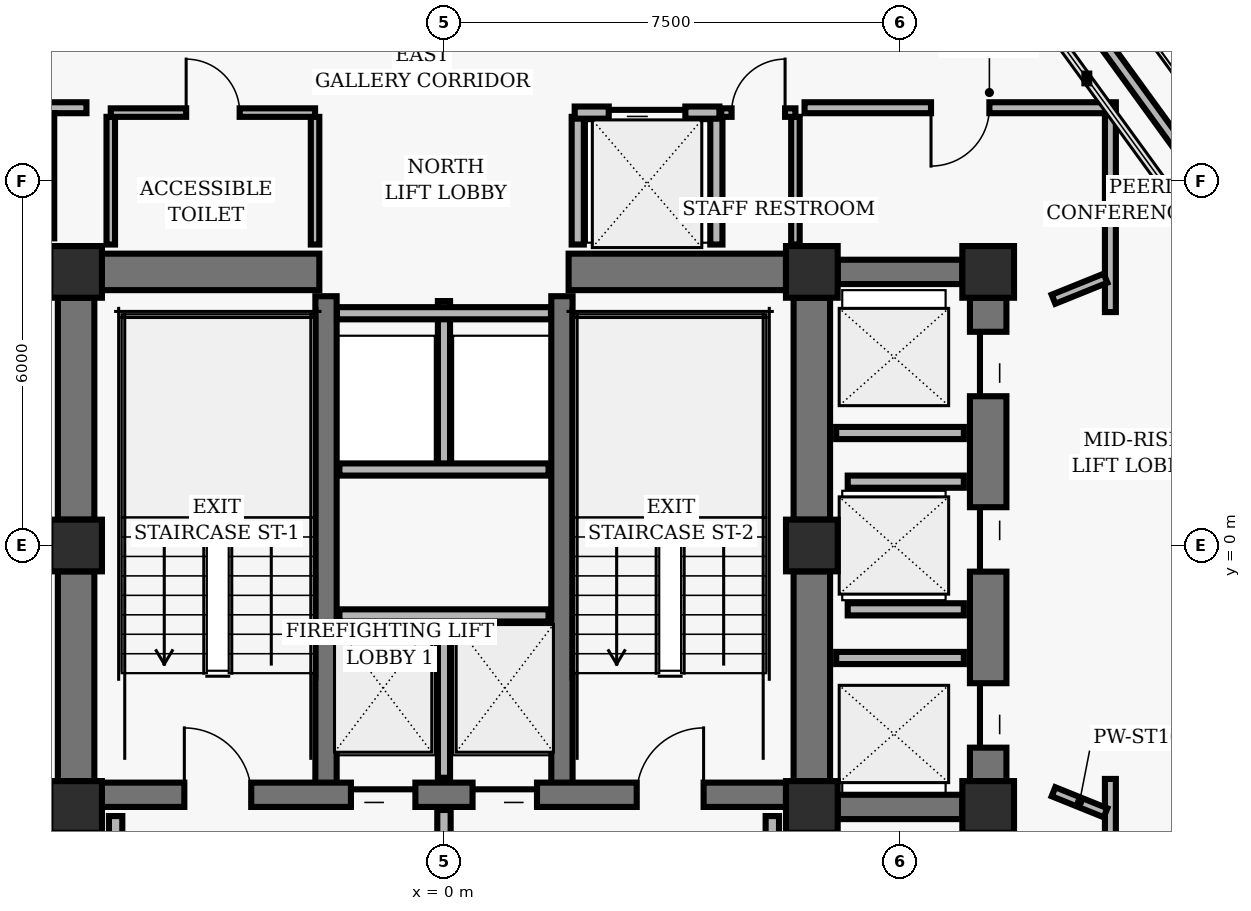
"""IFC4 building model, lengths in metres.
Left out: names, types, materials, properties, quantities, classifications, styles, units other than length and angle.
Written with IfcOpenShell. Run it as: python <this file> out.ifc"""

import sys

from ifc_helpers import new_model, si_unit, direction, frame, frame_2d, origin, origin_2d, place, context, subcontext, project, spatial, rectangle, hollow_rectangle, extrude, element, fill, save


model = new_model("IFC4")
c1 = context("Model", 3, precision=1e-05, world=origin(), true_north=direction((0.0, 1.0)))
c2 = subcontext(c1, "Body", "Model", "MODEL_VIEW")
j1 = project(units=[si_unit("LENGTHUNIT", "METRE"), si_unit("PLANEANGLEUNIT", "RADIAN")], contexts=[c1])
p1 = place(None, origin())
s1 = spatial("IfcSite", under=j1, at=p1, CompositionType="ELEMENT")
p2 = place(p1, origin())
s2 = spatial("IfcBuilding", under=s1, at=p2, CompositionType="ELEMENT")
p3 = place(p2, frame((0.0, 0.0, 119.84)))
s3 = spatial("IfcBuildingStorey", under=s2, at=p3, CompositionType="ELEMENT", Elevation=119.84)
for number, where, z_axis, x_axis in (
    (1, (-6.05, 4.5, 0.0), (0.0, 0.0, 1.0), (1.0, 0.0, 0.0)),
    (2, (6.05, 4.5, 0.0), (0.0, 0.0, 1.0), (1.0, 0.0, 0.0)),
    (3, (-6.05, 0.0, 0.0), (0.0, 0.0, 1.0), (1.0, 0.0, 0.0)),
    (4, (6.05, 0.0, 0.0), (0.0, 0.0, 1.0), (1.0, 0.0, 0.0)),
    (5, (-6.05, -4.3, 0.0), (0.0, 0.0, 1.0), (1.0, 0.0, 0.0)),
    (6, (6.05, -4.3, 0.0), (0.0, 0.0, 1.0), (1.0, 0.0, 0.0)),
    (7, (8.95, 4.5, 0.0), (0.0, 0.0, 1.0), (1.0, 0.0, 0.0)),
    (8, (8.95, -4.3, 0.0), (0.0, 0.0, 1.0), (1.0, 0.0, 0.0)),
):
    element("IfcColumn", number, at=place(p3, frame(where, z_axis=z_axis, x_axis=x_axis)), inside=s3, PredefinedType="COLUMN", context=c2, shape_type="SweptSolid", body=[
        extrude(hollow_rectangle(XDim=0.85, YDim=0.85, WallThickness=0.055, InnerFilletRadius=0.02, OuterFilletRadius=0.04, at=origin_2d()), origin(), (0.0, 0.0, 1.0), 3.04),
    ])
p4 = place(p3, frame((-6.05, 0.425, 0.0), z_axis=(0.0, 0.0, 1.0), x_axis=(0.0, 1.0, 0.0)))
e9 = element("IfcWall", 9, at=p4, inside=s3, PredefinedType="SHEAR", context=c2, shape_type="SweptSolid", body=[
    extrude(rectangle(XDim=3.65, YDim=0.6, at=frame_2d((1.825, 0.0))), origin(), (0.0, 0.0, 1.0), 2.788),
])
p5 = place(p3, frame((-6.05, -3.875, 0.0), z_axis=(0.0, 0.0, 1.0), x_axis=(0.0, 1.0, 0.0)))
e10 = element("IfcWall", 10, at=p5, inside=s3, PredefinedType="SHEAR", context=c2, shape_type="SweptSolid", body=[
    extrude(rectangle(XDim=3.45, YDim=0.6, at=frame_2d((1.725, 0.0))), origin(), (0.0, 0.0, 1.0), 2.788),
])
p6 = place(p3, frame((6.05, 0.425, 0.0), z_axis=(0.0, 0.0, 1.0), x_axis=(0.0, 1.0, 0.0)))
e11 = element("IfcWall", 11, at=p6, inside=s3, PredefinedType="SHEAR", context=c2, shape_type="SweptSolid", body=[
    extrude(rectangle(XDim=3.65, YDim=0.6, at=frame_2d((1.825, 0.0))), origin(), (0.0, 0.0, 1.0), 2.788),
])
p7 = place(p3, frame((6.05, -3.875, 0.0), z_axis=(0.0, 0.0, 1.0), x_axis=(0.0, 1.0, 0.0)))
e12 = element("IfcWall", 12, at=p7, inside=s3, PredefinedType="SHEAR", context=c2, shape_type="SweptSolid", body=[
    extrude(rectangle(XDim=3.45, YDim=0.6, at=frame_2d((1.725, 0.0))), origin(), (0.0, 0.0, 1.0), 2.788),
])
for number, where, z_axis, x_axis in (
    (13, (-1.94, -4.1, 0.0), (0.0, 0.0, 1.0), (0.0, 1.0, 0.0)),
    (14, (1.94, -4.1, 0.0), (0.0, 0.0, 1.0), (0.0, 1.0, 0.0)),
):
    element("IfcWall", number, at=place(p3, frame(where, z_axis=z_axis, x_axis=x_axis)), inside=s3, PredefinedType="SHEAR", context=c2, shape_type="SweptSolid", body=[
        extrude(rectangle(XDim=8.2, YDim=0.35, at=frame_2d((4.1, 0.0))), origin(), (0.0, 0.0, 1.0), 2.788),
    ])
p8 = place(p3, frame((-5.625, -4.1, 0.0), z_axis=(0.0, 0.0, 1.0), x_axis=(1.0, 0.0, 0.0)))
e15 = element("IfcWall", 15, at=p8, inside=s3, PredefinedType="SHEAR", context=c2, shape_type="SweptSolid", body=[
    extrude(rectangle(XDim=11.25, YDim=0.4, at=frame_2d((5.625, 0.0))), origin(), (0.0, 0.0, 1.0), 2.788),
])
p9 = place(p8, frame((1.355, 0.0, 0.0)))
e16 = element("IfcOpeningElement", 16, at=p9, cuts=e15, PredefinedType="OPENING", context=c2, shape_type="SweptSolid", body=[
    extrude(rectangle(XDim=1.1, YDim=2.04, at=frame_2d((0.55, 1.02))), frame((0.0, 0.21, 0.0), z_axis=(0.0, -1.0, 0.0), x_axis=(1.0, 0.0, 0.0)), (0.0, 0.0, 1.0), 0.42),
])
p10 = place(p8, frame((8.795, 0.0, 0.0)))
e17 = element("IfcOpeningElement", 17, at=p10, cuts=e15, PredefinedType="OPENING", context=c2, shape_type="SweptSolid", body=[
    extrude(rectangle(XDim=1.1, YDim=2.04, at=frame_2d((0.55, 1.02))), frame((0.0, 0.21, 0.0), z_axis=(0.0, -1.0, 0.0), x_axis=(1.0, 0.0, 0.0)), (0.0, 0.0, 1.0), 0.42),
])
p11 = place(p8, frame((4.095, 0.0, 0.0)))
e18 = element("IfcOpeningElement", 18, at=p11, cuts=e15, PredefinedType="OPENING", context=c2, shape_type="SweptSolid", body=[
    extrude(rectangle(XDim=1.06, YDim=2.04, at=frame_2d((0.53, 1.02))), frame((0.0, 0.21, 0.0), z_axis=(0.0, -1.0, 0.0), x_axis=(1.0, 0.0, 0.0)), (0.0, 0.0, 1.0), 0.42),
])
p12 = place(p8, frame((6.095, 0.0, 0.0)))
e19 = element("IfcOpeningElement", 19, at=p12, cuts=e15, PredefinedType="OPENING", context=c2, shape_type="SweptSolid", body=[
    extrude(rectangle(XDim=1.06, YDim=2.04, at=frame_2d((0.53, 1.02))), frame((0.0, 0.21, 0.0), z_axis=(0.0, -1.0, 0.0), x_axis=(1.0, 0.0, 0.0)), (0.0, 0.0, 1.0), 0.42),
])
for number, where, z_axis, x_axis in (
    (20, (-5.625, 4.5, 0.0), (0.0, 0.0, 1.0), (1.0, 0.0, 0.0)),
    (21, (2.05, 4.5, 0.0), (0.0, 0.0, 1.0), (1.0, 0.0, 0.0)),
):
    element("IfcWall", number, at=place(p3, frame(where, z_axis=z_axis, x_axis=x_axis)), inside=s3, PredefinedType="SHEAR", context=c2, shape_type="SweptSolid", body=[
        extrude(rectangle(XDim=3.575, YDim=0.6, at=frame_2d((1.788, 0.0))), origin(), (0.0, 0.0, 1.0), 2.788),
    ])
p13 = place(p3, frame((8.95, -3.875, 0.0), z_axis=(0.0, 0.0, 1.0), x_axis=(0.0, 1.0, 0.0)))
e22 = element("IfcWall", 22, at=p13, inside=s3, PredefinedType="SHEAR", context=c2, shape_type="SweptSolid", body=[
    extrude(rectangle(XDim=7.95, YDim=0.6, at=frame_2d((3.975, 0.0))), origin(), (0.0, 0.0, 1.0), 2.788),
])
p14 = place(p13, frame((0.55, 0.0, 0.0)))
e23 = element("IfcOpeningElement", 23, at=p14, cuts=e22, PredefinedType="OPENING", context=c2, shape_type="SweptSolid", body=[
    extrude(rectangle(XDim=1.06, YDim=2.04, at=frame_2d((0.53, 1.02))), frame((0.0, 0.31, 0.0), z_axis=(0.0, -1.0, 0.0), x_axis=(1.0, 0.0, 0.0)), (0.0, 0.0, 1.0), 0.62),
])
p15 = place(p13, frame((3.445, 0.0, 0.0)))
e24 = element("IfcOpeningElement", 24, at=p15, cuts=e22, PredefinedType="OPENING", context=c2, shape_type="SweptSolid", body=[
    extrude(rectangle(XDim=1.06, YDim=2.04, at=frame_2d((0.53, 1.02))), frame((0.0, 0.31, 0.0), z_axis=(0.0, -1.0, 0.0), x_axis=(1.0, 0.0, 0.0)), (0.0, 0.0, 1.0), 0.62),
])
p16 = place(p13, frame((6.33, 0.0, 0.0)))
e25 = element("IfcOpeningElement", 25, at=p16, cuts=e22, PredefinedType="OPENING", context=c2, shape_type="SweptSolid", body=[
    extrude(rectangle(XDim=1.06, YDim=2.04, at=frame_2d((0.53, 1.02))), frame((0.0, 0.31, 0.0), z_axis=(0.0, -1.0, 0.0), x_axis=(1.0, 0.0, 0.0)), (0.0, 0.0, 1.0), 0.62),
])
for number, where, z_axis, x_axis in (
    (26, (6.475, 4.5, 0.0), (0.0, 0.0, 1.0), (1.0, 0.0, 0.0)),
    (27, (6.475, -4.3, 0.0), (0.0, 0.0, 1.0), (1.0, 0.0, 0.0)),
):
    element("IfcWall", number, at=place(p3, frame(where, z_axis=z_axis, x_axis=x_axis)), inside=s3, PredefinedType="SHEAR", context=c2, shape_type="SweptSolid", body=[
        extrude(rectangle(XDim=2.05, YDim=0.4, at=frame_2d((1.025, 0.0))), origin(), (0.0, 0.0, 1.0), 2.788),
    ])
p17 = place(p3, frame((0.0, -3.82, 0.0), z_axis=(0.0, 0.0, 1.0), x_axis=(0.0, 1.0, 0.0)))
e28 = element("IfcWall", 28, at=p17, inside=s3, PredefinedType="PARTITIONING", context=c2, shape_type="SweptSolid", body=[
    extrude(rectangle(XDim=2.67, YDim=0.2, at=frame_2d((1.335, 0.0))), origin(), (0.0, 0.0, 1.0), 2.763),
])
p18 = place(p3, frame((-1.72, -1.15, 0.0), z_axis=(0.0, 0.0, 1.0), x_axis=(1.0, 0.0, 0.0)))
e29 = element("IfcWall", 29, at=p18, inside=s3, PredefinedType="PARTITIONING", context=c2, shape_type="SweptSolid", body=[
    extrude(rectangle(XDim=3.44, YDim=0.2, at=frame_2d((1.72, 0.0))), origin(), (0.0, 0.0, 1.0), 2.763),
])
for number, where, z_axis, x_axis in (
    (30, (-5.4, -7.16, 0.0), (0.0, 0.0, 1.0), (0.0, 1.0, 0.0)),
    (31, (5.4, -7.16, 0.0), (0.0, 0.0, 1.0), (0.0, 1.0, 0.0)),
):
    element("IfcWall", number, at=place(p3, frame(where, z_axis=z_axis, x_axis=x_axis)), inside=s3, PredefinedType="PARTITIONING", context=c2, shape_type="SweptSolid", body=[
        extrude(rectangle(XDim=2.71, YDim=0.22, at=frame_2d((1.355, 0.0))), origin(), (0.0, 0.0, 1.0), 2.763),
    ])
p19 = place(p3, frame((0.0, -7.16, 0.0), z_axis=(0.0, 0.0, 1.0), x_axis=(0.0, 1.0, 0.0)))
e32 = element("IfcWall", 32, at=p19, inside=s3, PredefinedType="PARTITIONING", context=c2, shape_type="SweptSolid", body=[
    extrude(rectangle(XDim=2.81, YDim=0.22, at=frame_2d((1.405, 0.0))), origin(), (0.0, 0.0, 1.0), 2.763),
])
p20 = place(p3, frame((0.0, 1.25, 0.0), z_axis=(0.0, 0.0, 1.0), x_axis=(0.0, 1.0, 0.0)))
e33 = element("IfcWall", 33, at=p20, inside=s3, PredefinedType="PARTITIONING", context=c2, shape_type="SweptSolid", body=[
    extrude(rectangle(XDim=2.77, YDim=0.2, at=frame_2d((1.385, 0.0))), origin(), (0.0, 0.0, 1.0), 2.763),
])
p21 = place(p3, frame((-1.72, 1.25, 0.0), z_axis=(0.0, 0.0, 1.0), x_axis=(1.0, 0.0, 0.0)))
e34 = element("IfcWall", 34, at=p21, inside=s3, PredefinedType="PARTITIONING", context=c2, shape_type="SweptSolid", body=[
    extrude(rectangle(XDim=3.44, YDim=0.2, at=frame_2d((1.72, 0.0))), origin(), (0.0, 0.0, 1.0), 2.763),
])
p22 = place(p3, frame((-1.76, 3.82, 0.0), z_axis=(0.0, 0.0, 1.0), x_axis=(1.0, 0.0, 0.0)))
e35 = element("IfcWall", 35, at=p22, inside=s3, PredefinedType="PARTITIONING", context=c2, shape_type="SweptSolid", body=[
    extrude(rectangle(XDim=3.52, YDim=0.2, at=frame_2d((1.76, 0.0))), origin(), (0.0, 0.0, 1.0), 2.763),
])
p23 = place(p3, frame((2.2, 4.95, 0.0), z_axis=(0.0, 0.0, 1.0), x_axis=(0.0, 1.0, 0.0)))
e36 = element("IfcWall", 36, at=p23, inside=s3, PredefinedType="PARTITIONING", context=c2, shape_type="SweptSolid", body=[
    extrude(rectangle(XDim=2.1, YDim=0.2, at=frame_2d((1.05, 0.0))), origin(), (0.0, 0.0, 1.0), 2.132),
])
p24 = place(p3, frame((4.48, 4.95, 0.0), z_axis=(0.0, 0.0, 1.0), x_axis=(0.0, 1.0, 0.0)))
e37 = element("IfcWall", 37, at=p24, inside=s3, PredefinedType="PARTITIONING", context=c2, shape_type="SweptSolid", body=[
    extrude(rectangle(XDim=2.1, YDim=0.2, at=frame_2d((1.05, 0.0))), origin(), (0.0, 0.0, 1.0), 2.763),
])
p25 = place(p3, frame((2.15, 7.12, 0.0), z_axis=(0.0, 0.0, 1.0), x_axis=(1.0, 0.0, 0.0)))
e38 = element("IfcWall", 38, at=p25, inside=s3, PredefinedType="PARTITIONING", context=c2, shape_type="SweptSolid", body=[
    extrude(rectangle(XDim=2.38, YDim=0.2, at=frame_2d((1.19, 0.0))), origin(), (0.0, 0.0, 1.0), 2.763),
])
p26 = place(p25, frame((0.56, 0.0, 0.0)))
e39 = element("IfcOpeningElement", 39, at=p26, cuts=e38, PredefinedType="OPENING", context=c2, shape_type="SweptSolid", body=[
    extrude(rectangle(XDim=1.26, YDim=2.06, at=frame_2d((0.63, 1.03))), frame((0.0, 0.11, 0.0), z_axis=(0.0, -1.0, 0.0), x_axis=(1.0, 0.0, 0.0)), (0.0, 0.0, 1.0), 0.22),
])
for number, where, z_axis, x_axis in (
    (40, (-5.48, 4.95, 0.0), (0.0, 0.0, 1.0), (0.0, 1.0, 0.0)),
    (41, (-2.12, 4.95, 0.0), (0.0, 0.0, 1.0), (0.0, 1.0, 0.0)),
):
    element("IfcWall", number, at=place(p3, frame(where, z_axis=z_axis, x_axis=x_axis)), inside=s3, PredefinedType="PARTITIONING", context=c2, shape_type="SweptSolid", body=[
        extrude(rectangle(XDim=2.1, YDim=0.14, at=frame_2d((1.05, 0.0))), origin(), (0.0, 0.0, 1.0), 2.763),
    ])
p27 = place(p3, frame((-5.48, 7.12, 0.0), z_axis=(0.0, 0.0, 1.0), x_axis=(1.0, 0.0, 0.0)))
e42 = element("IfcWall", 42, at=p27, inside=s3, PredefinedType="PARTITIONING", context=c2, shape_type="SweptSolid", body=[
    extrude(rectangle(XDim=3.36, YDim=0.14, at=frame_2d((1.68, 0.0))), origin(), (0.0, 0.0, 1.0), 2.763),
])
p28 = place(p27, frame((1.24, 0.0, 0.0)))
e43 = element("IfcOpeningElement", 43, at=p28, cuts=e42, PredefinedType="OPENING", context=c2, shape_type="SweptSolid", body=[
    extrude(rectangle(XDim=0.88, YDim=2.02, at=frame_2d((0.44, 1.01))), frame((0.0, 0.08, 0.0), z_axis=(0.0, -1.0, 0.0), x_axis=(1.0, 0.0, 0.0)), (0.0, 0.0, 1.0), 0.16),
])
p29 = place(p3, frame((5.78, 4.95, 0.0), z_axis=(0.0, 0.0, 1.0), x_axis=(0.0, 1.0, 0.0)))
e44 = element("IfcWall", 44, at=p29, inside=s3, PredefinedType="PARTITIONING", context=c2, shape_type="SweptSolid", body=[
    extrude(rectangle(XDim=2.1, YDim=0.14, at=frame_2d((1.05, 0.0))), origin(), (0.0, 0.0, 1.0), 2.132),
])
p30 = place(p3, frame((4.56, 7.12, 0.0), z_axis=(0.0, 0.0, 1.0), x_axis=(1.0, 0.0, 0.0)))
e45 = element("IfcWall", 45, at=p30, inside=s3, PredefinedType="PARTITIONING", context=c2, shape_type="SweptSolid", body=[
    extrude(rectangle(XDim=1.22, YDim=0.14, at=frame_2d((0.61, 0.0))), origin(), (0.0, 0.0, 1.0), 2.763),
])
p31 = place(p30, frame((0.17, 0.0, 0.0)))
e46 = element("IfcOpeningElement", 46, at=p31, cuts=e45, PredefinedType="OPENING", context=c2, shape_type="SweptSolid", body=[
    extrude(rectangle(XDim=0.88, YDim=2.02, at=frame_2d((0.44, 1.01))), frame((0.0, 0.08, 0.0), z_axis=(0.0, -1.0, 0.0), x_axis=(1.0, 0.0, 0.0)), (0.0, 0.0, 1.0), 0.16),
])
for number, where, z_axis, x_axis in (
    (47, (6.45, -1.85, 0.0), (0.0, 0.0, 1.0), (1.0, 0.0, 0.0)),
    (48, (6.45, 1.85, 0.0), (0.0, 0.0, 1.0), (1.0, 0.0, 0.0)),
):
    element("IfcWall", number, at=place(p3, frame(where, z_axis=z_axis, x_axis=x_axis)), inside=s3, PredefinedType="PARTITIONING", context=c2, shape_type="SweptSolid", body=[
        extrude(rectangle(XDim=2.1, YDim=0.2, at=frame_2d((1.05, 0.0))), origin(), (0.0, 0.0, 1.0), 2.763),
    ])
for number, where, z_axis, x_axis in (
    (49, (6.64, -1.05, 0.0), (0.0, 0.0, 1.0), (1.0, 0.0, 0.0)),
    (50, (6.64, 1.05, 0.0), (0.0, 0.0, 1.0), (1.0, 0.0, 0.0)),
):
    element("IfcWall", number, at=place(p3, frame(where, z_axis=z_axis, x_axis=x_axis)), inside=s3, PredefinedType="PARTITIONING", context=c2, shape_type="SweptSolid", body=[
        extrude(rectangle(XDim=1.91, YDim=0.2, at=frame_2d((0.955, 0.0))), origin(), (0.0, 0.0, 1.0), 2.763),
    ])
p32 = place(p3, frame((10.263, 9.077, 0.0), z_axis=(0.0, 0.0, 1.0), x_axis=(0.587780951295, -0.809020119215, 0.0)))
e51 = element("IfcWall", 51, at=p32, inside=s3, PredefinedType="PARTITIONING", context=c2, shape_type="SweptSolid", body=[
    extrude(rectangle(XDim=7.469, YDim=0.18, at=frame_2d((3.734, 0.0))), origin(), (0.0, 0.0, 1.0), 2.763),
])
for number, where, z_axis, x_axis in (
    (52, (10.96, -7.11, 0.0), (0.0, 0.0, 1.0), (0.0, 1.0, 0.0)),
    (53, (10.96, 3.84, 0.0), (0.0, 0.0, 1.0), (0.0, 1.0, 0.0)),
):
    element("IfcWall", number, at=place(p3, frame(where, z_axis=z_axis, x_axis=x_axis)), inside=s3, PredefinedType="PARTITIONING", context=c2, shape_type="SweptSolid", body=[
        extrude(rectangle(XDim=3.271, YDim=0.18, at=frame_2d((1.635, 0.0))), origin(), (0.0, 0.0, 1.0), 2.763),
    ])
p33 = place(p3, frame((11.05, 7.2, 0.0), z_axis=(0.0, 0.0, 1.0), x_axis=(-1.0, 0.0, 0.0)))
e54 = element("IfcWall", 54, at=p33, inside=s3, PredefinedType="PARTITIONING", context=c2, shape_type="SweptSolid", body=[
    extrude(rectangle(XDim=5.12, YDim=0.18, at=frame_2d((2.56, 0.0))), origin(), (0.0, 0.0, 1.0), 2.763),
])
p34 = place(p33, frame((2.08, 0.0, 0.0)))
e55 = element("IfcOpeningElement", 55, at=p34, cuts=e54, PredefinedType="OPENING", context=c2, shape_type="SweptSolid", body=[
    extrude(rectangle(XDim=0.96, YDim=2.02, at=frame_2d((0.48, 1.01))), frame((0.0, 0.1, 0.0), z_axis=(0.0, -1.0, 0.0), x_axis=(1.0, 0.0, 0.0)), (0.0, 0.0, 1.0), 0.2),
])
p35 = place(p3, frame((-5.88, 7.2, 0.0), z_axis=(0.0, 0.0, 1.0), x_axis=(-1.0, 0.0, 0.0)))
e56 = element("IfcWall", 56, at=p35, inside=s3, PredefinedType="PARTITIONING", context=c2, shape_type="SweptSolid", body=[
    extrude(rectangle(XDim=0.71, YDim=0.18, at=frame_2d((0.355, 0.0))), origin(), (0.0, 0.0, 1.0), 2.763),
])
p36 = place(p3, frame((-6.5, 7.11, 0.0), z_axis=(0.0, 0.0, 1.0), x_axis=(0.0, -1.0, 0.0)))
e57 = element("IfcWall", 57, at=p36, inside=s3, PredefinedType="PARTITIONING", context=c2, shape_type="SweptSolid", body=[
    extrude(rectangle(XDim=2.058, YDim=0.18, at=frame_2d((1.029, 0.0))), origin(), (0.0, 0.0, 1.0), 2.763),
])
for number, where, z_axis, x_axis in (
    (58, (10.024, -4.05, 0.0), (0.0, 0.0, 1.0), (0.927, -0.375, 0.0)),
    (59, (10.024, 4.05, 0.0), (0.0, 0.0, 1.0), (0.927, 0.375, 0.0)),
):
    element("IfcWall", number, at=place(p3, frame(where, z_axis=z_axis, x_axis=x_axis)), inside=s3, PredefinedType="PARTITIONING", context=c2, shape_type="SweptSolid", body=[
        extrude(rectangle(XDim=0.923, YDim=0.16, at=frame_2d((0.461, 0.0))), origin(), (0.0, 0.0, 1.0), 2.763),
    ])
p37 = place(p9, origin())
e60 = element("IfcDoor", 60, at=p37, inside=s3, OperationType="SINGLE_SWING_LEFT", PredefinedType="DOOR", context=c2, shape_type="SweptSolid", body=[
    extrude(rectangle(XDim=1.1, YDim=2.04, at=frame_2d((0.55, 1.02))), frame((0.0, 0.025, 0.0), z_axis=(0.0, -1.0, 0.0), x_axis=(1.0, 0.0, 0.0)), (0.0, 0.0, 1.0), 0.05),
])
fill(e16, e60)
p38 = place(p10, origin())
e61 = element("IfcDoor", 61, at=p38, inside=s3, OperationType="SINGLE_SWING_RIGHT", PredefinedType="DOOR", context=c2, shape_type="SweptSolid", body=[
    extrude(rectangle(XDim=1.1, YDim=2.04, at=frame_2d((0.55, 1.02))), frame((0.0, 0.025, 0.0), z_axis=(0.0, -1.0, 0.0), x_axis=(1.0, 0.0, 0.0)), (0.0, 0.0, 1.0), 0.05),
])
fill(e17, e61)
p39 = place(p11, origin())
e62 = element("IfcDoor", 62, at=p39, inside=s3, OperationType="SLIDING_TO_LEFT", PredefinedType="DOOR", context=c2, shape_type="SweptSolid", body=[
    extrude(rectangle(XDim=1.06, YDim=2.04, at=frame_2d((0.53, 1.02))), frame((0.0, 0.025, 0.0), z_axis=(0.0, -1.0, 0.0), x_axis=(1.0, 0.0, 0.0)), (0.0, 0.0, 1.0), 0.05),
])
fill(e18, e62)
p40 = place(p12, origin())
e63 = element("IfcDoor", 63, at=p40, inside=s3, OperationType="SLIDING_TO_RIGHT", PredefinedType="DOOR", context=c2, shape_type="SweptSolid", body=[
    extrude(rectangle(XDim=1.06, YDim=2.04, at=frame_2d((0.53, 1.02))), frame((0.0, 0.025, 0.0), z_axis=(0.0, -1.0, 0.0), x_axis=(1.0, 0.0, 0.0)), (0.0, 0.0, 1.0), 0.05),
])
fill(e19, e63)
p41 = place(p26, origin())
e64 = element("IfcDoor", 64, at=p41, inside=s3, OperationType="SLIDING_TO_LEFT", PredefinedType="DOOR", context=c2, shape_type="SweptSolid", body=[
    extrude(rectangle(XDim=1.26, YDim=2.06, at=frame_2d((0.63, 1.03))), frame((0.0, 0.025, 0.0), z_axis=(0.0, -1.0, 0.0), x_axis=(1.0, 0.0, 0.0)), (0.0, 0.0, 1.0), 0.05),
])
fill(e39, e64)
p42 = place(p28, origin())
e65 = element("IfcDoor", 65, at=p42, inside=s3, OperationType="SINGLE_SWING_LEFT", PredefinedType="DOOR", context=c2, shape_type="SweptSolid", body=[
    extrude(rectangle(XDim=0.88, YDim=2.02, at=frame_2d((0.44, 1.01))), frame((0.0, 0.025, 0.0), z_axis=(0.0, -1.0, 0.0), x_axis=(1.0, 0.0, 0.0)), (0.0, 0.0, 1.0), 0.05),
])
fill(e43, e65)
p43 = place(p31, origin())
e66 = element("IfcDoor", 66, at=p43, inside=s3, OperationType="SINGLE_SWING_RIGHT", PredefinedType="DOOR", context=c2, shape_type="SweptSolid", body=[
    extrude(rectangle(XDim=0.88, YDim=2.02, at=frame_2d((0.44, 1.01))), frame((0.0, 0.025, 0.0), z_axis=(0.0, -1.0, 0.0), x_axis=(1.0, 0.0, 0.0)), (0.0, 0.0, 1.0), 0.05),
])
fill(e46, e66)
p44 = place(p14, origin())
e67 = element("IfcDoor", 67, at=p44, inside=s3, OperationType="SLIDING_TO_LEFT", PredefinedType="DOOR", context=c2, shape_type="SweptSolid", body=[
    extrude(rectangle(XDim=1.06, YDim=2.04, at=frame_2d((0.53, 1.02))), frame((0.0, 0.025, 0.0), z_axis=(0.0, -1.0, 0.0), x_axis=(1.0, 0.0, 0.0)), (0.0, 0.0, 1.0), 0.05),
])
fill(e23, e67)
p45 = place(p15, origin())
e68 = element("IfcDoor", 68, at=p45, inside=s3, OperationType="SLIDING_TO_RIGHT", PredefinedType="DOOR", context=c2, shape_type="SweptSolid", body=[
    extrude(rectangle(XDim=1.06, YDim=2.04, at=frame_2d((0.53, 1.02))), frame((0.0, 0.025, 0.0), z_axis=(0.0, -1.0, 0.0), x_axis=(1.0, 0.0, 0.0)), (0.0, 0.0, 1.0), 0.05),
])
fill(e24, e68)
p46 = place(p16, origin())
e69 = element("IfcDoor", 69, at=p46, inside=s3, OperationType="SLIDING_TO_LEFT", PredefinedType="DOOR", context=c2, shape_type="SweptSolid", body=[
    extrude(rectangle(XDim=1.06, YDim=2.04, at=frame_2d((0.53, 1.02))), frame((0.0, 0.025, 0.0), z_axis=(0.0, -1.0, 0.0), x_axis=(1.0, 0.0, 0.0)), (0.0, 0.0, 1.0), 0.05),
])
fill(e25, e69)
p47 = place(p34, origin())
e70 = element("IfcDoor", 70, at=p47, inside=s3, OperationType="SINGLE_SWING_RIGHT", PredefinedType="DOOR", context=c2, shape_type="SweptSolid", body=[
    extrude(rectangle(XDim=0.96, YDim=2.02, at=frame_2d((0.48, 1.01))), frame((0.0, 0.025, 0.0), z_axis=(0.0, -1.0, 0.0), x_axis=(1.0, 0.0, 0.0)), (0.0, 0.0, 1.0), 0.05),
])
fill(e55, e70)
save(model, sys.argv[1])
